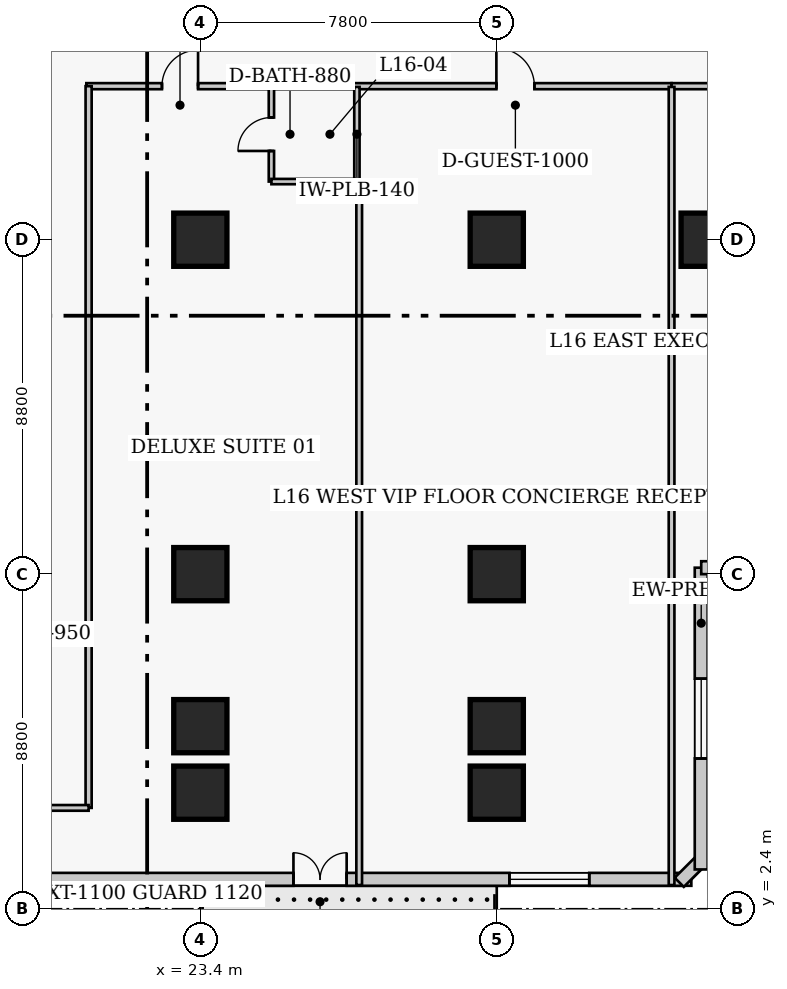
"""IFC4 building model, lengths in metres.
Left out: names, types, materials, properties, quantities, classifications, styles, units other than length and angle.
Written with IfcOpenShell. Run it as: python <this file> out.ifc"""

import sys

from ifc_helpers import new_model, si_unit, direction, frame, frame_2d, origin, origin_2d, place, context, subcontext, project, spatial, rectangle, extrude, element, fill, save


model = new_model("IFC4")
c1 = context("Model", 3, precision=1e-05, world=origin(), true_north=direction((0.0, 1.0)))
c2 = subcontext(c1, "Body", "Model", "MODEL_VIEW")
j1 = project(units=[si_unit("LENGTHUNIT", "METRE"), si_unit("PLANEANGLEUNIT", "RADIAN")], contexts=[c1])
p1 = place(None, origin())
s1 = spatial("IfcSite", under=j1, at=p1, CompositionType="ELEMENT")
p2 = place(p1, origin())
s2 = spatial("IfcBuilding", under=s1, at=p2, CompositionType="ELEMENT")
p3 = place(p2, frame((0.0, 0.0, 67.8)))
s3 = spatial("IfcBuildingStorey", under=s2, at=p3, CompositionType="ELEMENT", Elevation=67.8)
for number, where, z_axis, x_axis in (
    (1, (23.4, 11.2, 0.0), (0.0, 0.0, 1.0), (1.0, 0.0, 0.0)),
    (2, (23.4, 20.0, 0.0), (0.0, 0.0, 1.0), (1.0, 0.0, 0.0)),
    (3, (31.2, 11.2, 0.0), (0.0, 0.0, 1.0), (1.0, 0.0, 0.0)),
    (4, (31.2, 20.0, 0.0), (0.0, 0.0, 1.0), (1.0, 0.0, 0.0)),
    (5, (36.75, 20.0, 0.0), (0.0, 0.0, 1.0), (1.0, 0.0, 0.0)),
    (6, (23.4, 7.2, 0.0), (0.0, 0.0, 1.0), (1.0, 0.0, 0.0)),
    (7, (31.2, 7.2, 0.0), (0.0, 0.0, 1.0), (1.0, 0.0, 0.0)),
    (8, (23.4, 5.45, 0.0), (0.0, 0.0, 1.0), (1.0, 0.0, 0.0)),
    (9, (31.2, 5.45, 0.0), (0.0, 0.0, 1.0), (1.0, 0.0, 0.0)),
):
    element("IfcColumn", number, at=place(p3, frame(where, z_axis=z_axis, x_axis=x_axis)), inside=s3, PredefinedType="COLUMN", context=c2, shape_type="SweptSolid", body=[
        extrude(rectangle(XDim=1.4, YDim=1.4, at=origin_2d()), origin(), (0.0, 0.0, 1.0), 3.8),
    ])
p4 = place(p3, frame((6.43, 3.17, 0.0), z_axis=(0.0, 0.0, 1.0), x_axis=(1.0, 0.0, 0.0)))
e10 = element("IfcWall", 10, at=p4, inside=s3, PredefinedType="SOLIDWALL", context=c2, shape_type="SweptSolid", body=[
    extrude(rectangle(XDim=29.89, YDim=0.34, at=frame_2d((14.945, 0.0))), origin(), (0.0, 0.0, 1.0), 3.54),
])
p5 = place(p4, frame((19.42, 0.0, 0.0)))
e11 = element("IfcOpeningElement", 11, at=p5, cuts=e10, PredefinedType="OPENING", context=c2, shape_type="SweptSolid", body=[
    extrude(rectangle(XDim=1.4, YDim=2.15, at=frame_2d((0.7, 1.075))), frame((0.0, 0.18, 0.0), z_axis=(0.0, -1.0, 0.0), x_axis=(1.0, 0.0, 0.0)), (0.0, 0.0, 1.0), 0.36),
])
p6 = place(p4, frame((2.686, 0.0, 0.85)))
e12 = element("IfcOpeningElement", 12, at=p6, cuts=e10, PredefinedType="OPENING", context=c2, shape_type="SweptSolid", body=[
    extrude(rectangle(XDim=2.1, YDim=1.85, at=frame_2d((1.05, 0.925))), frame((0.0, 0.18, 0.0), z_axis=(0.0, -1.0, 0.0), x_axis=(1.0, 0.0, 0.0)), (0.0, 0.0, 1.0), 0.36),
])
p7 = place(p4, frame((9.009, 0.0, 0.85)))
e13 = element("IfcOpeningElement", 13, at=p7, cuts=e10, PredefinedType="OPENING", context=c2, shape_type="SweptSolid", body=[
    extrude(rectangle(XDim=2.1, YDim=1.85, at=frame_2d((1.05, 0.925))), frame((0.0, 0.18, 0.0), z_axis=(0.0, -1.0, 0.0), x_axis=(1.0, 0.0, 0.0)), (0.0, 0.0, 1.0), 0.36),
])
p8 = place(p4, frame((25.104, 0.0, 0.85)))
e14 = element("IfcOpeningElement", 14, at=p8, cuts=e10, PredefinedType="OPENING", context=c2, shape_type="SweptSolid", body=[
    extrude(rectangle(XDim=2.1, YDim=1.85, at=frame_2d((1.05, 0.925))), frame((0.0, 0.18, 0.0), z_axis=(0.0, -1.0, 0.0), x_axis=(1.0, 0.0, 0.0)), (0.0, 0.0, 1.0), 0.36),
])
p9 = place(p3, frame((36.001, 3.092, 0.0), z_axis=(0.0, 0.0, 1.0), x_axis=(0.707106781187, 0.707106781187, 0.0)))
e15 = element("IfcWall", 15, at=p9, inside=s3, PredefinedType="SOLIDWALL", context=c2, shape_type="SweptSolid", body=[
    extrude(rectangle(XDim=0.929, YDim=0.34, at=frame_2d((0.464, 0.0))), origin(), (0.0, 0.0, 1.0), 3.54),
])
p10 = place(p3, frame((36.58, 3.43, 0.0), z_axis=(0.0, 0.0, 1.0), x_axis=(0.0, 1.0, 0.0)))
e16 = element("IfcWall", 16, at=p10, inside=s3, PredefinedType="SOLIDWALL", context=c2, shape_type="SweptSolid", body=[
    extrude(rectangle(XDim=7.94, YDim=0.34, at=frame_2d((3.97, 0.0))), origin(), (0.0, 0.0, 1.0), 3.54),
])
p11 = place(p10, frame((2.92, 0.0, 0.85)))
e17 = element("IfcOpeningElement", 17, at=p11, cuts=e16, PredefinedType="OPENING", context=c2, shape_type="SweptSolid", body=[
    extrude(rectangle(XDim=2.1, YDim=1.85, at=frame_2d((1.05, 0.925))), frame((0.0, 0.18, 0.0), z_axis=(0.0, -1.0, 0.0), x_axis=(1.0, 0.0, 0.0)), (0.0, 0.0, 1.0), 0.36),
])
p12 = place(p3, frame((36.58, 11.37, 0.0), z_axis=(0.0, 0.0, 1.0), x_axis=(1.0, 0.0, 0.0)))
e18 = element("IfcWall", 18, at=p12, inside=s3, PredefinedType="SOLIDWALL", context=c2, shape_type="SweptSolid", body=[
    extrude(rectangle(XDim=4.84, YDim=0.34, at=frame_2d((2.42, 0.0))), origin(), (0.0, 0.0, 1.0), 3.54),
])
p13 = place(p12, frame((1.37, 0.0, 0.85)))
e19 = element("IfcOpeningElement", 19, at=p13, cuts=e18, PredefinedType="OPENING", context=c2, shape_type="SweptSolid", body=[
    extrude(rectangle(XDim=2.1, YDim=1.85, at=frame_2d((1.05, 0.925))), frame((0.0, 0.18, 0.0), z_axis=(0.0, -1.0, 0.0), x_axis=(1.0, 0.0, 0.0)), (0.0, 0.0, 1.0), 0.36),
])
p14 = place(p3, frame((20.4, 24.04, 0.0), z_axis=(0.0, 0.0, 1.0), x_axis=(1.0, 0.0, 0.0)))
e20 = element("IfcWall", 20, at=p14, inside=s3, PredefinedType="PARTITIONING", context=c2, shape_type="SweptSolid", body=[
    extrude(rectangle(XDim=15.4, YDim=0.16, at=frame_2d((7.7, 0.0))), origin(), (0.0, 0.0, 1.0), 3.54),
])
p15 = place(p14, frame((1.99, 0.0, 0.0)))
e21 = element("IfcOpeningElement", 21, at=p15, cuts=e20, PredefinedType="OPENING", context=c2, shape_type="SweptSolid", body=[
    extrude(rectangle(XDim=0.95, YDim=2.1, at=frame_2d((0.475, 1.05))), frame((0.0, 0.09, 0.0), z_axis=(0.0, -1.0, 0.0), x_axis=(1.0, 0.0, 0.0)), (0.0, 0.0, 1.0), 0.18),
])
p16 = place(p14, frame((10.79, 0.0, 0.0)))
e22 = element("IfcOpeningElement", 22, at=p16, cuts=e20, PredefinedType="OPENING", context=c2, shape_type="SweptSolid", body=[
    extrude(rectangle(XDim=1.0, YDim=2.15, at=frame_2d((0.5, 1.075))), frame((0.0, 0.09, 0.0), z_axis=(0.0, -1.0, 0.0), x_axis=(1.0, 0.0, 0.0)), (0.0, 0.0, 1.0), 0.18),
])
p17 = place(p3, frame((35.8, 24.04, 0.0), z_axis=(0.0, 0.0, 1.0), x_axis=(1.0, 0.0, 0.0)))
e23 = element("IfcWall", 23, at=p17, inside=s3, PredefinedType="PARTITIONING", context=c2, shape_type="SweptSolid", body=[
    extrude(rectangle(XDim=23.5, YDim=0.16, at=frame_2d((11.75, 0.0))), origin(), (0.0, 0.0, 1.0), 3.54),
])
p18 = place(p17, frame((2.705, 0.0, 0.0)))
e24 = element("IfcOpeningElement", 24, at=p18, cuts=e23, PredefinedType="OPENING", context=c2, shape_type="SweptSolid", body=[
    extrude(rectangle(XDim=1.0, YDim=2.15, at=frame_2d((0.5, 1.075))), frame((0.0, 0.09, 0.0), z_axis=(0.0, -1.0, 0.0), x_axis=(1.0, 0.0, 0.0)), (0.0, 0.0, 1.0), 0.18),
])
p19 = place(p17, frame((10.02, 0.0, 0.0)))
e25 = element("IfcOpeningElement", 25, at=p19, cuts=e23, PredefinedType="OPENING", context=c2, shape_type="SweptSolid", body=[
    extrude(rectangle(XDim=0.95, YDim=2.1, at=frame_2d((0.475, 1.05))), frame((0.0, 0.09, 0.0), z_axis=(0.0, -1.0, 0.0), x_axis=(1.0, 0.0, 0.0)), (0.0, 0.0, 1.0), 0.18),
])
p20 = place(p17, frame((15.88, 0.0, 0.0)))
e26 = element("IfcOpeningElement", 26, at=p20, cuts=e23, PredefinedType="OPENING", context=c2, shape_type="SweptSolid", body=[
    extrude(rectangle(XDim=0.95, YDim=2.1, at=frame_2d((0.475, 1.05))), frame((0.0, 0.09, 0.0), z_axis=(0.0, -1.0, 0.0), x_axis=(1.0, 0.0, 0.0)), (0.0, 0.0, 1.0), 0.18),
])
p21 = place(p17, frame((19.155, 0.0, 0.0)))
e27 = element("IfcOpeningElement", 27, at=p21, cuts=e23, PredefinedType="OPENING", context=c2, shape_type="SweptSolid", body=[
    extrude(rectangle(XDim=0.95, YDim=2.1, at=frame_2d((0.475, 1.05))), frame((0.0, 0.09, 0.0), z_axis=(0.0, -1.0, 0.0), x_axis=(1.0, 0.0, 0.0)), (0.0, 0.0, 1.0), 0.18),
])
p22 = place(p3, frame((20.46, 5.05, 0.0), z_axis=(0.0, 0.0, 1.0), x_axis=(0.0, 1.0, 0.0)))
e28 = element("IfcWall", 28, at=p22, inside=s3, PredefinedType="PARTITIONING", context=c2, shape_type="SweptSolid", body=[
    extrude(rectangle(XDim=18.99, YDim=0.16, at=frame_2d((9.495, 0.0))), origin(), (0.0, 0.0, 1.0), 3.54),
])
p23 = place(p3, frame((18.24, 5.05, 0.0), z_axis=(0.0, 0.0, 1.0), x_axis=(1.0, 0.0, 0.0)))
e29 = element("IfcWall", 29, at=p23, inside=s3, PredefinedType="PARTITIONING", context=c2, shape_type="SweptSolid", body=[
    extrude(rectangle(XDim=2.22, YDim=0.15, at=frame_2d((1.11, 0.0))), origin(), (0.0, 0.0, 1.0), 3.54),
])
p24 = place(p3, frame((25.27, 21.53, 0.0), z_axis=(0.0, 0.0, 1.0), x_axis=(0.0, 1.0, 0.0)))
e30 = element("IfcWall", 30, at=p24, inside=s3, PredefinedType="PLUMBINGWALL", context=c2, shape_type="SweptSolid", body=[
    extrude(rectangle(XDim=2.49, YDim=0.14, at=frame_2d((1.245, 0.0))), origin(), (0.0, 0.0, 1.0), 3.54),
])
p25 = place(p24, frame((0.805, 0.0, 0.0)))
e31 = element("IfcOpeningElement", 31, at=p25, cuts=e30, PredefinedType="OPENING", context=c2, shape_type="SweptSolid", body=[
    extrude(rectangle(XDim=0.88, YDim=2.05, at=frame_2d((0.44, 1.025))), frame((0.0, 0.08, 0.0), z_axis=(0.0, -1.0, 0.0), x_axis=(1.0, 0.0, 0.0)), (0.0, 0.0, 1.0), 0.16),
])
p26 = place(p3, frame((27.52, 21.53, 0.0), z_axis=(0.0, 0.0, 1.0), x_axis=(0.0, 1.0, 0.0)))
e32 = element("IfcWall", 32, at=p26, inside=s3, PredefinedType="PLUMBINGWALL", context=c2, shape_type="SweptSolid", body=[
    extrude(rectangle(XDim=2.49, YDim=0.14, at=frame_2d((1.245, 0.0))), origin(), (0.0, 0.0, 1.0), 3.54),
])
p27 = place(p3, frame((25.27, 21.53, 0.0), z_axis=(0.0, 0.0, 1.0), x_axis=(1.0, 0.0, 0.0)))
e33 = element("IfcWall", 33, at=p27, inside=s3, PredefinedType="PLUMBINGWALL", context=c2, shape_type="SweptSolid", body=[
    extrude(rectangle(XDim=2.25, YDim=0.14, at=frame_2d((1.125, 0.0))), origin(), (0.0, 0.0, 1.0), 3.54),
])
p28 = place(p3, frame((27.58, 3.02, 0.0), z_axis=(0.0, 0.0, 1.0), x_axis=(0.0, 1.0, 0.0)))
e34 = element("IfcWall", 34, at=p28, inside=s3, PredefinedType="PARTITIONING", context=c2, shape_type="SweptSolid", body=[
    extrude(rectangle(XDim=18.51, YDim=0.15, at=frame_2d((9.255, 0.0))), origin(), (0.0, 0.0, 1.0), 3.54),
])
p29 = place(p3, frame((35.8, 3.02, 0.0), z_axis=(0.0, 0.0, 1.0), x_axis=(0.0, 1.0, 0.0)))
e35 = element("IfcWall", 35, at=p29, inside=s3, PredefinedType="PARTITIONING", context=c2, shape_type="SweptSolid", body=[
    extrude(rectangle(XDim=21.0, YDim=0.15, at=frame_2d((10.5, 0.0))), origin(), (0.0, 0.0, 1.0), 3.54),
])
p30 = place(p5, origin())
e36 = element("IfcDoor", 36, at=p30, inside=s3, OperationType="DOUBLE_DOOR_SINGLE_SWING", PredefinedType="DOOR", context=c2, shape_type="SweptSolid", body=[
    extrude(rectangle(XDim=1.4, YDim=2.15, at=frame_2d((0.7, 1.075))), frame((0.0, 0.025, 0.0), z_axis=(0.0, -1.0, 0.0), x_axis=(1.0, 0.0, 0.0)), (0.0, 0.0, 1.0), 0.05),
])
fill(e11, e36)
p31 = place(p8, origin())
e37 = element("IfcWindow", 37, at=p31, inside=s3, PartitioningType="SINGLE_PANEL", PredefinedType="WINDOW", context=c2, shape_type="SweptSolid", body=[
    extrude(rectangle(XDim=2.1, YDim=1.85, at=frame_2d((1.05, 0.925))), frame((0.0, 0.03, 0.0), z_axis=(0.0, -1.0, 0.0), x_axis=(1.0, 0.0, 0.0)), (0.0, 0.0, 1.0), 0.06),
])
fill(e14, e37)
p32 = place(p11, origin())
e38 = element("IfcWindow", 38, at=p32, inside=s3, PartitioningType="SINGLE_PANEL", PredefinedType="WINDOW", context=c2, shape_type="SweptSolid", body=[
    extrude(rectangle(XDim=2.1, YDim=1.85, at=frame_2d((1.05, 0.925))), frame((0.0, 0.03, 0.0), z_axis=(0.0, -1.0, 0.0), x_axis=(1.0, 0.0, 0.0)), (0.0, 0.0, 1.0), 0.06),
])
fill(e17, e38)
p33 = place(p25, origin())
e39 = element("IfcDoor", 39, at=p33, inside=s3, OperationType="SINGLE_SWING_LEFT", PredefinedType="DOOR", context=c2, shape_type="SweptSolid", body=[
    extrude(rectangle(XDim=0.88, YDim=2.05, at=frame_2d((0.44, 1.025))), frame((0.0, 0.025, 0.0), z_axis=(0.0, -1.0, 0.0), x_axis=(1.0, 0.0, 0.0)), (0.0, 0.0, 1.0), 0.05),
])
fill(e31, e39)
p34 = place(p15, origin())
e40 = element("IfcDoor", 40, at=p34, inside=s3, OperationType="SINGLE_SWING_RIGHT", PredefinedType="DOOR", context=c2, shape_type="SweptSolid", body=[
    extrude(rectangle(XDim=0.95, YDim=2.1, at=frame_2d((0.475, 1.05))), frame((0.0, 0.025, 0.0), z_axis=(0.0, -1.0, 0.0), x_axis=(1.0, 0.0, 0.0)), (0.0, 0.0, 1.0), 0.05),
])
fill(e21, e40)
p35 = place(p16, origin())
e41 = element("IfcDoor", 41, at=p35, inside=s3, OperationType="SINGLE_SWING_LEFT", PredefinedType="DOOR", context=c2, shape_type="SweptSolid", body=[
    extrude(rectangle(XDim=1.0, YDim=2.15, at=frame_2d((0.5, 1.075))), frame((0.0, 0.025, 0.0), z_axis=(0.0, -1.0, 0.0), x_axis=(1.0, 0.0, 0.0)), (0.0, 0.0, 1.0), 0.05),
])
fill(e22, e41)
save(model, sys.argv[1])
